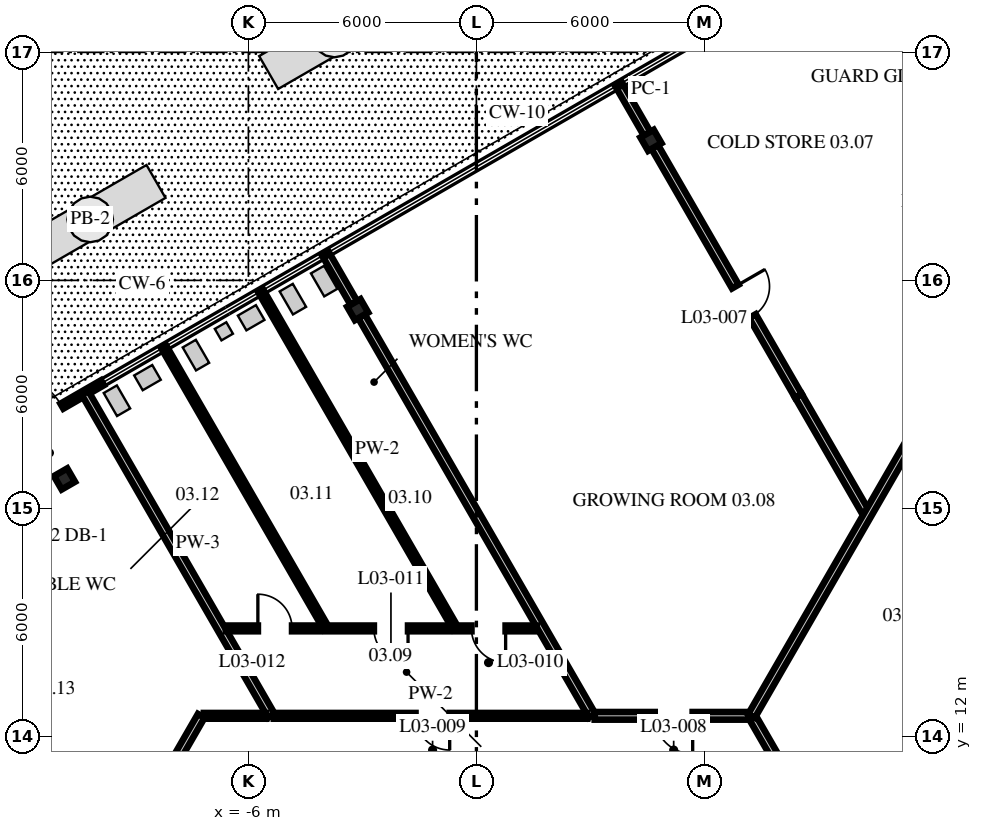
"""IFC4 building model, lengths in metres.
Left out: names, types, materials, properties, quantities, classifications, styles, units other than length and angle.
Written with IfcOpenShell. Run it as: python <this file> out.ifc"""

import sys

from ifc_helpers import new_model, si_unit, direction, frame, frame_2d, origin, origin_2d, place, context, subcontext, project, spatial, rectangle, i_section, extrude, source, transform, mapped, element, fill, save


model = new_model("IFC4")
c1 = context("Model", 3, precision=1e-05, world=origin(), true_north=direction((0.0, 1.0)))
c2 = subcontext(c1, "Body", "Model", "MODEL_VIEW")
j1 = project(units=[si_unit("LENGTHUNIT", "METRE"), si_unit("PLANEANGLEUNIT", "RADIAN")], contexts=[c1])
p1 = place(None, origin())
s1 = spatial("IfcSite", under=j1, at=p1, CompositionType="ELEMENT")
p2 = place(p1, origin())
s2 = spatial("IfcBuilding", under=s1, at=p2, CompositionType="ELEMENT")
p3 = place(p2, frame((0.0, 0.0, 16.0)))
s3 = spatial("IfcBuildingStorey", under=s2, at=p3, CompositionType="ELEMENT", Elevation=16.0)
m1 = source(origin(), c2, "Body", "SweptSolid", [
    extrude(i_section(OverallWidth=0.404, OverallDepth=0.406, WebThickness=0.027, FlangeThickness=0.044, at=origin_2d()), origin(), (0.0, 0.0, 1.0), 4.3),
])
for number, where, z_axis, x_axis in (
    (1, (4.593, 27.685, 0.0), (0.0, 0.0, 1.0), (-0.866, -0.5, 0.0)),
    (2, (-3.124, 23.23, 0.0), (0.0, 0.0, 1.0), (-0.866, -0.5, 0.0)),
    (3, (-10.84, 18.775, 0.0), (0.0, 0.0, 1.0), (-0.866, -0.5, 0.0)),
):
    element("IfcColumn", number, at=place(p3, frame(where, z_axis=z_axis, x_axis=x_axis)), inside=s3, PredefinedType="COLUMN", context=c2, shape_type="MappedRepresentation", body=[
        mapped(m1, transform((0.0, 0.0, 0.0), scale=1.0)),
    ])
m2 = source(origin(), c2, "Body", "SweptSolid", [
    extrude(rectangle(XDim=4.263, YDim=0.15, at=frame_2d((2.131, 0.0))), origin(), (0.0, 0.0, 1.0), 4.1),
])
p4 = place(p3, frame((-13.531, 19.175, 0.0), z_axis=(0.0, 0.0, 1.0), x_axis=(0.8660282166, 0.499995128029, 0.0)))
e4 = element("IfcWall", 4, at=p4, inside=s3, PredefinedType="ELEMENTEDWALL", context=c2, shape_type="MappedRepresentation", body=[
    mapped(m2, transform((0.0, 0.0, 0.0), scale=1.0)),
])
p5 = place(p4, frame((1.231, 0.0, 0.0)))
e5 = element("IfcOpeningElement", 5, at=p5, cuts=e4, PredefinedType="OPENING", context=c2, shape_type="SweptSolid", body=[
    extrude(rectangle(XDim=1.8, YDim=2.4, at=frame_2d((0.9, 1.2))), frame((0.0, 0.085, 0.0), z_axis=(0.0, -1.0, 0.0), x_axis=(1.0, 0.0, 0.0)), (0.0, 0.0, 1.0), 0.17),
])
m3 = source(origin(), c2, "Body", "SweptSolid", [
    extrude(rectangle(XDim=9.813, YDim=0.2, at=frame_2d((4.906, 0.0))), origin(), (0.0, 0.0, 1.0), 4.1),
])
p6 = place(p3, frame((-10.3, 21.04, 0.0), z_axis=(0.0, 0.0, 1.0), x_axis=(0.49999238347, -0.866029801145, 0.0)))
e6 = element("IfcWall", 6, at=p6, inside=s3, PredefinedType="PARTITIONING", context=c2, shape_type="MappedRepresentation", body=[
    mapped(m3, transform((0.0, 0.0, 0.0), scale=1.0)),
])
p7 = place(p3, frame((-8.222, 22.24, 0.0), z_axis=(0.0, 0.0, 1.0), x_axis=(0.500002832459, -0.866023768457, 0.0)))
e7 = element("IfcWall", 7, at=p7, inside=s3, PredefinedType="PARTITIONING", context=c2, shape_type="SweptSolid", body=[
    extrude(rectangle(XDim=8.542, YDim=0.15, at=frame_2d((4.271, 0.0))), origin(), (0.0, 0.0, 1.0), 4.1),
])
p8 = place(p3, frame((-5.67, 23.713, 0.0), z_axis=(0.0, 0.0, 1.0), x_axis=(0.500017481723, -0.866015310472, 0.0)))
e8 = element("IfcWall", 8, at=p8, inside=s3, PredefinedType="PARTITIONING", context=c2, shape_type="SweptSolid", body=[
    extrude(rectangle(XDim=10.243, YDim=0.15, at=frame_2d((5.122, 0.0))), origin(), (0.0, 0.0, 1.0), 4.1),
])
m4 = source(origin(), c2, "Body", "SweptSolid", [
    extrude(rectangle(XDim=1.499, YDim=0.2, at=frame_2d((0.75, 0.0))), origin(), (0.0, 0.0, 1.0), 4.1),
])
p9 = place(p3, frame((-3.969, 24.695, 0.0), z_axis=(0.0, 0.0, 1.0), x_axis=(0.499905760005, -0.866079806435, 0.0)))
e9 = element("IfcWall", 9, at=p9, inside=s3, PredefinedType="PARTITIONING", context=c2, shape_type="MappedRepresentation", body=[
    mapped(m4, transform((0.0, 0.0, 0.0), scale=1.0)),
])
m5 = source(origin(), c2, "Body", "SweptSolid", [
    extrude(rectangle(XDim=12.148, YDim=0.2, at=frame_2d((6.074, 0.0))), origin(), (0.0, 0.0, 1.0), 3.343),
])
p10 = place(p3, frame((-3.027, 23.063, 0.0), z_axis=(0.0, 0.0, 1.0), x_axis=(0.499997320042, -0.866026951053, 0.0)))
e10 = element("IfcWall", 10, at=p10, inside=s3, PredefinedType="PARTITIONING", context=c2, shape_type="MappedRepresentation", body=[
    mapped(m5, transform((0.0, 0.0, 0.0), scale=1.0)),
])
p11 = place(p3, frame((7.276, 12.482, 0.0), z_axis=(0.0, 0.0, 1.0), x_axis=(0.500043273698, -0.866000418262, 0.0)))
e11 = element("IfcWall", 11, at=p11, inside=s3, PredefinedType="PARTITIONING", context=c2, shape_type="SweptSolid", body=[
    extrude(rectangle(XDim=4.809, YDim=0.2, at=frame_2d((2.404, 0.0))), origin(), (0.0, 0.0, 1.0), 4.1),
])
m6 = source(origin(), c2, "Body", "SweptSolid", [
    extrude(rectangle(XDim=1.499, YDim=0.2, at=frame_2d((0.749, 0.0))), origin(), (0.0, 0.0, 1.0), 4.1),
])
p12 = place(p3, frame((3.747, 29.15, 0.0), z_axis=(0.0, 0.0, 1.0), x_axis=(0.499976292358, -0.866039090965, 0.0)))
e12 = element("IfcWall", 12, at=p12, inside=s3, PredefinedType="PARTITIONING", context=c2, shape_type="MappedRepresentation", body=[
    mapped(m6, transform((0.0, 0.0, 0.0), scale=1.0)),
])
m7 = source(origin(), c2, "Body", "SweptSolid", [
    extrude(rectangle(XDim=7.568, YDim=0.2, at=frame_2d((3.784, 0.0))), origin(), (0.0, 0.0, 1.0), 3.488),
])
p13 = place(p3, frame((4.689, 27.518, 0.0), z_axis=(0.0, 0.0, 1.0), x_axis=(0.499997032024, -0.866027117339, 0.0)))
e13 = element("IfcWall", 13, at=p13, inside=s3, PredefinedType="PARTITIONING", context=c2, shape_type="MappedRepresentation", body=[
    mapped(m7, transform((0.0, 0.0, 0.0), scale=1.0)),
])
p14 = place(p13, frame((4.248, 0.0, 0.0)))
e14 = element("IfcOpeningElement", 14, at=p14, cuts=e13, PredefinedType="OPENING", context=c2, shape_type="SweptSolid", body=[
    extrude(rectangle(XDim=0.9, YDim=2.1, at=frame_2d((0.45, 1.05))), frame((0.0, 0.11, 0.0), z_axis=(0.0, -1.0, 0.0), x_axis=(1.0, 0.0, 0.0)), (0.0, 0.0, 1.0), 0.22),
])
p15 = place(p3, frame((8.474, 20.963, 0.0), z_axis=(0.0, 0.0, 1.0), x_axis=(0.500009718699, -0.866019792618, 0.0)))
e15 = element("IfcWall", 15, at=p15, inside=s3, PredefinedType="PARTITIONING", context=c2, shape_type="SweptSolid", body=[
    extrude(rectangle(XDim=3.629, YDim=0.2, at=frame_2d((1.815, 0.0))), origin(), (0.0, 0.0, 1.0), 4.1),
])
p16 = place(p3, frame((-7.171, 12.542, 0.0), z_axis=(0.0, 0.0, 1.0), x_axis=(1.0, 0.0, 0.0)))
e16 = element("IfcWall", 16, at=p16, inside=s3, PredefinedType="PARTITIONING", context=c2, shape_type="SweptSolid", body=[
    extrude(rectangle(XDim=1.641, YDim=0.15, at=frame_2d((0.821, 0.0))), origin(), (0.0, 0.0, 1.0), 4.1),
])
p17 = place(p3, frame((-5.33, 12.542, 0.0), z_axis=(0.0, 0.0, 1.0), x_axis=(1.0, 0.0, 0.0)))
e17 = element("IfcWall", 17, at=p17, inside=s3, PredefinedType="PARTITIONING", context=c2, shape_type="SweptSolid", body=[
    extrude(rectangle(XDim=8.244, YDim=0.15, at=frame_2d((4.122, 0.0))), origin(), (0.0, 0.0, 1.0), 4.1),
])
p18 = place(p17, frame((3.727, 0.0, 0.0)))
e18 = element("IfcOpeningElement", 18, at=p18, cuts=e17, PredefinedType="OPENING", context=c2, shape_type="SweptSolid", body=[
    extrude(rectangle(XDim=0.9, YDim=2.1, at=frame_2d((0.45, 1.05))), frame((0.0, 0.085, 0.0), z_axis=(0.0, -1.0, 0.0), x_axis=(1.0, 0.0, 0.0)), (0.0, 0.0, 1.0), 0.17),
])
p19 = place(p3, frame((3.114, 12.542, 0.0), z_axis=(0.0, 0.0, 1.0), x_axis=(1.0, 0.0, 0.0)))
e19 = element("IfcWall", 19, at=p19, inside=s3, PredefinedType="PARTITIONING", context=c2, shape_type="SweptSolid", body=[
    extrude(rectangle(XDim=4.058, YDim=0.2, at=frame_2d((2.029, 0.0))), origin(), (0.0, 0.0, 1.0), 4.1),
])
p20 = place(p19, frame((1.578, 0.0, 0.0)))
e20 = element("IfcOpeningElement", 20, at=p20, cuts=e19, PredefinedType="OPENING", context=c2, shape_type="SweptSolid", body=[
    extrude(rectangle(XDim=1.0, YDim=2.1, at=frame_2d((0.5, 1.05))), frame((0.0, 0.11, 0.0), z_axis=(0.0, -1.0, 0.0), x_axis=(1.0, 0.0, 0.0)), (0.0, 0.0, 1.0), 0.22),
])
p21 = place(p3, frame((-6.592, 14.842, 0.0), z_axis=(0.0, 0.0, 1.0), x_axis=(1.0, 0.0, 0.0)))
e21 = element("IfcWall", 21, at=p21, inside=s3, PredefinedType="PARTITIONING", context=c2, shape_type="SweptSolid", body=[
    extrude(rectangle(XDim=8.181, YDim=0.15, at=frame_2d((4.09, 0.0))), origin(), (0.0, 0.0, 1.0), 4.1),
])
p22 = place(p21, frame((6.461, 0.0, 0.0)))
e22 = element("IfcOpeningElement", 22, at=p22, cuts=e21, PredefinedType="OPENING", context=c2, shape_type="SweptSolid", body=[
    extrude(rectangle(XDim=0.9, YDim=2.1, at=frame_2d((0.45, 1.05))), frame((0.0, 0.085, 0.0), z_axis=(0.0, -1.0, 0.0), x_axis=(1.0, 0.0, 0.0)), (0.0, 0.0, 1.0), 0.17),
])
p23 = place(p21, frame((3.893, 0.0, 0.0)))
e23 = element("IfcOpeningElement", 23, at=p23, cuts=e21, PredefinedType="OPENING", context=c2, shape_type="SweptSolid", body=[
    extrude(rectangle(XDim=0.9, YDim=2.1, at=frame_2d((0.45, 1.05))), frame((0.0, 0.085, 0.0), z_axis=(0.0, -1.0, 0.0), x_axis=(1.0, 0.0, 0.0)), (0.0, 0.0, 1.0), 0.17),
])
p24 = place(p21, frame((0.841, 0.0, 0.0)))
e24 = element("IfcOpeningElement", 24, at=p24, cuts=e21, PredefinedType="OPENING", context=c2, shape_type="SweptSolid", body=[
    extrude(rectangle(XDim=0.9, YDim=2.1, at=frame_2d((0.45, 1.05))), frame((0.0, 0.085, 0.0), z_axis=(0.0, -1.0, 0.0), x_axis=(1.0, 0.0, 0.0)), (0.0, 0.0, 1.0), 0.17),
])
p25 = place(p3, frame((10.795, 6.387, 0.0), z_axis=(0.0, 0.0, 1.0), x_axis=(0.499994080432, 0.866028821422, 0.0)))
e25 = element("IfcWall", 25, at=p25, inside=s3, PredefinedType="PARTITIONING", context=c2, shape_type="SweptSolid", body=[
    extrude(rectangle(XDim=19.269, YDim=0.2, at=frame_2d((9.635, 0.0))), origin(), (0.0, 0.0, 1.0), 4.1),
])
p26 = place(p25, frame((7.563, 0.0, 0.0)))
e26 = element("IfcOpeningElement", 26, at=p26, cuts=e25, PredefinedType="OPENING", context=c2, shape_type="SweptSolid", body=[
    extrude(rectangle(XDim=1.0, YDim=2.1, at=frame_2d((0.5, 1.05))), frame((0.0, 0.11, 0.0), z_axis=(0.0, -1.0, 0.0), x_axis=(1.0, 0.0, 0.0)), (0.0, 0.0, 1.0), 0.22),
])
p27 = place(p3, frame((9.755, 8.188, 0.0), z_axis=(0.0, 0.0, 1.0), x_axis=(0.500007734453, 0.86602093825, 0.0)))
e27 = element("IfcWall", 27, at=p27, inside=s3, PredefinedType="PARTITIONING", context=c2, shape_type="SweptSolid", body=[
    extrude(rectangle(XDim=20.199, YDim=0.2, at=frame_2d((10.1, 0.0))), origin(), (0.0, 0.0, 1.0), 4.1),
])
p28 = place(p27, frame((5.473, 0.0, 0.0)))
e28 = element("IfcOpeningElement", 28, at=p28, cuts=e27, PredefinedType="OPENING", context=c2, shape_type="SweptSolid", body=[
    extrude(rectangle(XDim=1.0, YDim=2.1, at=frame_2d((0.5, 1.05))), frame((0.0, 0.11, 0.0), z_axis=(0.0, -1.0, 0.0), x_axis=(1.0, 0.0, 0.0)), (0.0, 0.0, 1.0), 0.22),
])
p29 = place(p3, frame((7.241, 12.542, 0.0), z_axis=(0.0, 0.0, 1.0), x_axis=(0.49999906822, 0.866025941747, 0.0)))
e29 = element("IfcWall", 29, at=p29, inside=s3, PredefinedType="PARTITIONING", context=c2, shape_type="SweptSolid", body=[
    extrude(rectangle(XDim=10.136, YDim=0.2, at=frame_2d((5.068, 0.0))), origin(), (0.0, 0.0, 1.0), 4.1),
])
p30 = place(p3, frame((-12.307, 3.768, 0.0), z_axis=(0.0, 0.0, 1.0), x_axis=(0.500011000363, 0.866019052629, 0.0)))
e30 = element("IfcWall", 30, at=p30, inside=s3, PredefinedType="PARTITIONING", context=c2, shape_type="SweptSolid", body=[
    extrude(rectangle(XDim=10.132, YDim=0.2, at=frame_2d((5.066, 0.0))), origin(), (0.0, 0.0, 1.0), 4.1),
])
p31 = place(p30, frame((4.582, 0.0, 0.0)))
e31 = element("IfcOpeningElement", 31, at=p31, cuts=e30, PredefinedType="OPENING", context=c2, shape_type="SweptSolid", body=[
    extrude(rectangle(XDim=0.9, YDim=2.1, at=frame_2d((0.45, 1.05))), frame((0.0, 0.11, 0.0), z_axis=(0.0, -1.0, 0.0), x_axis=(1.0, 0.0, 0.0)), (0.0, 0.0, 1.0), 0.22),
])
p32 = place(p5, origin())
e32 = element("IfcDoor", 32, at=p32, inside=s3, OperationType="DOUBLE_DOOR_SINGLE_SWING", PredefinedType="DOOR", context=c2, shape_type="SweptSolid", body=[
    extrude(rectangle(XDim=1.8, YDim=2.4, at=frame_2d((0.9, 1.2))), frame((0.0, 0.025, 0.0), z_axis=(0.0, -1.0, 0.0), x_axis=(1.0, 0.0, 0.0)), (0.0, 0.0, 1.0), 0.05),
])
fill(e5, e32)
p33 = place(p14, origin())
e33 = element("IfcDoor", 33, at=p33, inside=s3, OperationType="SINGLE_SWING_LEFT", PredefinedType="DOOR", context=c2, shape_type="SweptSolid", body=[
    extrude(rectangle(XDim=0.9, YDim=2.1, at=frame_2d((0.45, 1.05))), frame((0.0, 0.025, 0.0), z_axis=(0.0, -1.0, 0.0), x_axis=(1.0, 0.0, 0.0)), (0.0, 0.0, 1.0), 0.05),
])
fill(e14, e33)
p34 = place(p20, origin())
e34 = element("IfcDoor", 34, at=p34, inside=s3, OperationType="SINGLE_SWING_RIGHT", PredefinedType="DOOR", context=c2, shape_type="SweptSolid", body=[
    extrude(rectangle(XDim=1.0, YDim=2.1, at=frame_2d((0.5, 1.05))), frame((0.0, 0.025, 0.0), z_axis=(0.0, -1.0, 0.0), x_axis=(1.0, 0.0, 0.0)), (0.0, 0.0, 1.0), 0.05),
])
fill(e20, e34)
p35 = place(p18, origin())
e35 = element("IfcDoor", 35, at=p35, inside=s3, OperationType="SINGLE_SWING_RIGHT", PredefinedType="DOOR", context=c2, shape_type="SweptSolid", body=[
    extrude(rectangle(XDim=0.9, YDim=2.1, at=frame_2d((0.45, 1.05))), frame((0.0, 0.025, 0.0), z_axis=(0.0, -1.0, 0.0), x_axis=(1.0, 0.0, 0.0)), (0.0, 0.0, 1.0), 0.05),
])
fill(e18, e35)
p36 = place(p22, origin())
e36 = element("IfcDoor", 36, at=p36, inside=s3, OperationType="SINGLE_SWING_RIGHT", PredefinedType="DOOR", context=c2, shape_type="SweptSolid", body=[
    extrude(rectangle(XDim=0.9, YDim=2.1, at=frame_2d((0.45, 1.05))), frame((0.0, 0.025, 0.0), z_axis=(0.0, -1.0, 0.0), x_axis=(1.0, 0.0, 0.0)), (0.0, 0.0, 1.0), 0.05),
])
fill(e22, e36)
p37 = place(p23, origin())
e37 = element("IfcDoor", 37, at=p37, inside=s3, OperationType="SINGLE_SWING_RIGHT", PredefinedType="DOOR", context=c2, shape_type="SweptSolid", body=[
    extrude(rectangle(XDim=0.9, YDim=2.1, at=frame_2d((0.45, 1.05))), frame((0.0, 0.025, 0.0), z_axis=(0.0, -1.0, 0.0), x_axis=(1.0, 0.0, 0.0)), (0.0, 0.0, 1.0), 0.05),
])
fill(e23, e37)
p38 = place(p24, origin())
e38 = element("IfcDoor", 38, at=p38, inside=s3, OperationType="SINGLE_SWING_LEFT", PredefinedType="DOOR", context=c2, shape_type="SweptSolid", body=[
    extrude(rectangle(XDim=0.9, YDim=2.1, at=frame_2d((0.45, 1.05))), frame((0.0, 0.025, 0.0), z_axis=(0.0, -1.0, 0.0), x_axis=(1.0, 0.0, 0.0)), (0.0, 0.0, 1.0), 0.05),
])
fill(e24, e38)
save(model, sys.argv[1])
